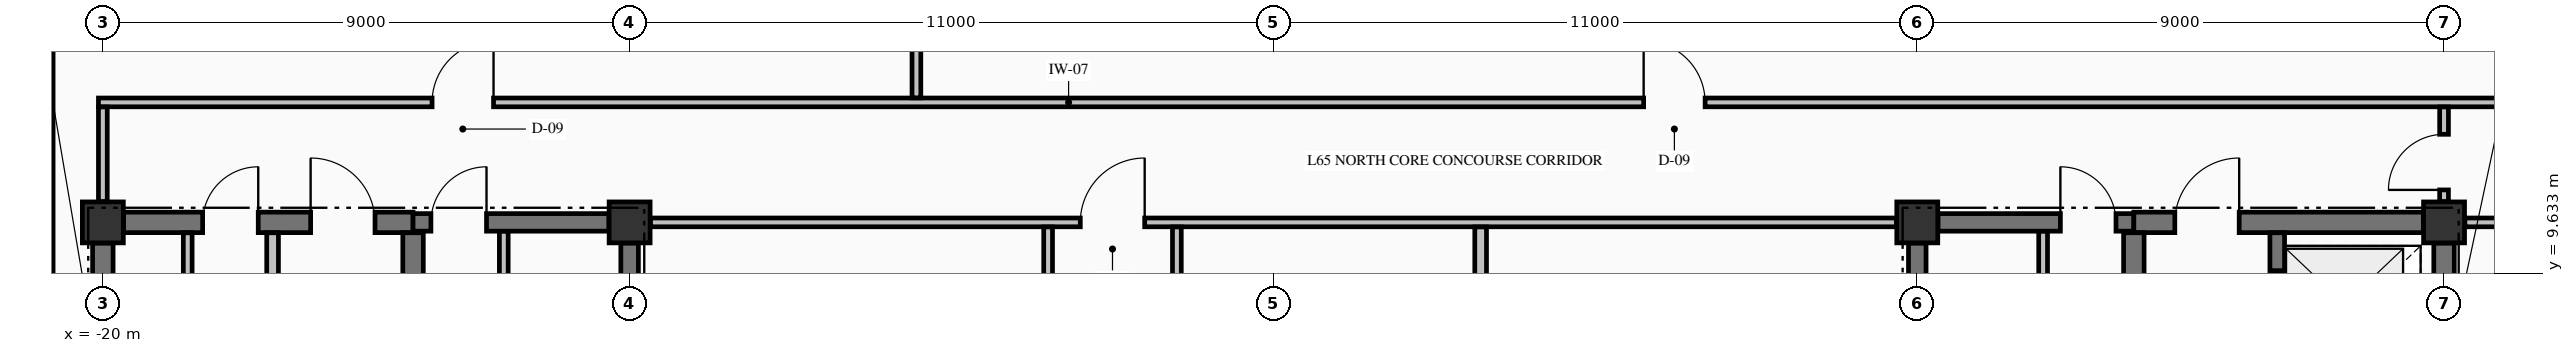
"""IFC4 building model, lengths in metres.
Left out: names, types, materials, properties, quantities, classifications, styles, units other than length and angle.
Written with IfcOpenShell. Run it as: python <this file> out.ifc"""

import sys

from ifc_helpers import new_model, si_unit, direction, frame, frame_2d, origin, origin_2d, place, context, subcontext, project, spatial, rectangle, extrude, element, fill, save


model = new_model("IFC4")
c1 = context("Model", 3, precision=1e-05, world=origin(), true_north=direction((0.0, 1.0)))
c2 = subcontext(c1, "Body", "Model", "MODEL_VIEW")
j1 = project(units=[si_unit("LENGTHUNIT", "METRE"), si_unit("PLANEANGLEUNIT", "RADIAN")], contexts=[c1])
p1 = place(None, origin())
s1 = spatial("IfcSite", under=j1, at=p1, CompositionType="ELEMENT")
p2 = place(p1, origin())
s2 = spatial("IfcBuilding", under=s1, at=p2, CompositionType="ELEMENT")
p3 = place(p2, frame((0.0, 0.0, 246.2)))
s3 = spatial("IfcBuildingStorey", under=s2, at=p3, CompositionType="ELEMENT", Elevation=246.2)
for number, where, z_axis, x_axis in (
    (1, (-20.0, 10.5, -0.25), (0.0, 0.0, 1.0), (1.0, 0.0, 0.0)),
    (2, (-11.0, 10.5, -0.25), (0.0, 0.0, 1.0), (1.0, 0.0, 0.0)),
    (3, (11.0, 10.5, -0.25), (0.0, 0.0, 1.0), (1.0, 0.0, 0.0)),
    (4, (20.0, 10.5, -0.25), (0.0, 0.0, 1.0), (1.0, 0.0, 0.0)),
):
    element("IfcColumn", number, at=place(p3, frame(where, z_axis=z_axis, x_axis=x_axis)), inside=s3, PredefinedType="COLUMN", context=c2, shape_type="SweptSolid", body=[
        extrude(rectangle(XDim=0.7, YDim=0.7, at=origin_2d()), origin(), (0.0, 0.0, 1.0), 3.055),
    ])
p4 = place(p3, frame((-21.0, 17.545, 0.0), z_axis=(0.0, 0.0, 1.0), x_axis=(0.0, -1.0, 0.0)))
e5 = element("IfcWall", 5, at=p4, inside=s3, PredefinedType="STANDARD", context=c2, shape_type="SweptSolid", body=[
    extrude(rectangle(XDim=8.09, YDim=0.3, at=frame_2d((4.045, 0.0))), origin(), (0.0, 0.0, 1.0), 2.197),
])
p5 = place(p3, frame((-19.646, 10.5, 0.0), z_axis=(0.0, 0.0, 1.0), x_axis=(1.0, 0.0, 0.0)))
e6 = element("IfcWall", 6, at=p5, inside=s3, PredefinedType="SHEAR", context=c2, shape_type="SweptSolid", body=[
    extrude(rectangle(XDim=4.946, YDim=0.35, at=frame_2d((2.473, 0.0))), origin(), (0.0, 0.0, 1.0), 2.805),
])
p6 = place(p5, frame((3.196, 0.0, 0.0)))
e7 = element("IfcOpeningElement", 7, at=p6, cuts=e6, PredefinedType="OPENING", context=c2, shape_type="SweptSolid", body=[
    extrude(rectangle(XDim=1.1, YDim=2.15, at=frame_2d((0.55, 1.075))), frame((0.0, 0.185, 0.0), z_axis=(0.0, -1.0, 0.0), x_axis=(1.0, 0.0, 0.0)), (0.0, 0.0, 1.0), 0.37),
])
p7 = place(p5, frame((1.351, 0.0, 0.0)))
e8 = element("IfcOpeningElement", 8, at=p7, cuts=e6, PredefinedType="OPENING", context=c2, shape_type="SweptSolid", body=[
    extrude(rectangle(XDim=0.95, YDim=2.15, at=frame_2d((0.475, 1.075))), frame((0.0, 0.185, 0.0), z_axis=(0.0, -1.0, 0.0), x_axis=(1.0, 0.0, 0.0)), (0.0, 0.0, 1.0), 0.37),
])
p8 = place(p3, frame((-14.7, 10.5, 0.0), z_axis=(0.0, 0.0, 1.0), x_axis=(1.0, 0.0, 0.0)))
e9 = element("IfcWall", 9, at=p8, inside=s3, PredefinedType="SHEAR", context=c2, shape_type="SweptSolid", body=[
    extrude(rectangle(XDim=3.346, YDim=0.3, at=frame_2d((1.673, 0.0))), origin(), (0.0, 0.0, 1.0), 2.805),
])
p9 = place(p8, frame((0.305, 0.0, 0.0)))
e10 = element("IfcOpeningElement", 10, at=p9, cuts=e9, PredefinedType="OPENING", context=c2, shape_type="SweptSolid", body=[
    extrude(rectangle(XDim=0.95, YDim=2.15, at=frame_2d((0.475, 1.075))), frame((0.0, 0.16, 0.0), z_axis=(0.0, -1.0, 0.0), x_axis=(1.0, 0.0, 0.0)), (0.0, 0.0, 1.0), 0.32),
])
p10 = place(p3, frame((11.354, 10.5, 0.0), z_axis=(0.0, 0.0, 1.0), x_axis=(1.0, 0.0, 0.0)))
e11 = element("IfcWall", 11, at=p10, inside=s3, PredefinedType="SHEAR", context=c2, shape_type="SweptSolid", body=[
    extrude(rectangle(XDim=3.346, YDim=0.3, at=frame_2d((1.673, 0.0))), origin(), (0.0, 0.0, 1.0), 2.805),
])
p11 = place(p10, frame((2.091, 0.0, 0.0)))
e12 = element("IfcOpeningElement", 12, at=p11, cuts=e11, PredefinedType="OPENING", context=c2, shape_type="SweptSolid", body=[
    extrude(rectangle(XDim=0.95, YDim=2.15, at=frame_2d((0.475, 1.075))), frame((0.0, 0.16, 0.0), z_axis=(0.0, -1.0, 0.0), x_axis=(1.0, 0.0, 0.0)), (0.0, 0.0, 1.0), 0.32),
])
p12 = place(p3, frame((14.7, 10.5, 0.0), z_axis=(0.0, 0.0, 1.0), x_axis=(1.0, 0.0, 0.0)))
e13 = element("IfcWall", 13, at=p12, inside=s3, PredefinedType="SHEAR", context=c2, shape_type="SweptSolid", body=[
    extrude(rectangle(XDim=4.946, YDim=0.35, at=frame_2d((2.473, 0.0))), origin(), (0.0, 0.0, 1.0), 2.805),
])
p13 = place(p12, frame((0.7, 0.0, 0.0)))
e14 = element("IfcOpeningElement", 14, at=p13, cuts=e13, PredefinedType="OPENING", context=c2, shape_type="SweptSolid", body=[
    extrude(rectangle(XDim=1.1, YDim=2.15, at=frame_2d((0.55, 1.075))), frame((0.0, 0.185, 0.0), z_axis=(0.0, -1.0, 0.0), x_axis=(1.0, 0.0, 0.0)), (0.0, 0.0, 1.0), 0.37),
])
p14 = place(p3, frame((-10.644, 10.5, 0.0), z_axis=(0.0, 0.0, 1.0), x_axis=(1.0, 0.0, 0.0)))
e15 = element("IfcWall", 15, at=p14, inside=s3, PredefinedType="PARTITIONING", context=c2, shape_type="SweptSolid", body=[
    extrude(rectangle(XDim=21.288, YDim=0.15, at=frame_2d((10.644, 0.0))), origin(), (0.0, 0.0, 1.0), 2.805),
])
p15 = place(p14, frame((7.344, 0.0, 0.0)))
e16 = element("IfcOpeningElement", 16, at=p15, cuts=e15, PredefinedType="OPENING", context=c2, shape_type="SweptSolid", body=[
    extrude(rectangle(XDim=1.1, YDim=2.15, at=frame_2d((0.55, 1.075))), frame((0.0, 0.085, 0.0), z_axis=(0.0, -1.0, 0.0), x_axis=(1.0, 0.0, 0.0)), (0.0, 0.0, 1.0), 0.17),
])
p16 = place(p3, frame((20.356, 10.5, 0.0), z_axis=(0.0, 0.0, 1.0), x_axis=(1.0, 0.0, 0.0)))
e17 = element("IfcWall", 17, at=p16, inside=s3, PredefinedType="PARTITIONING", context=c2, shape_type="SweptSolid", body=[
    extrude(rectangle(XDim=5.479, YDim=0.15, at=frame_2d((2.74, 0.0))), origin(), (0.0, 0.0, 1.0), 2.805),
])
p17 = place(p16, frame((2.169, 0.0, 0.0)))
e18 = element("IfcOpeningElement", 18, at=p17, cuts=e17, PredefinedType="OPENING", context=c2, shape_type="SweptSolid", body=[
    extrude(rectangle(XDim=0.95, YDim=2.15, at=frame_2d((0.475, 1.075))), frame((0.0, 0.085, 0.0), z_axis=(0.0, -1.0, 0.0), x_axis=(1.0, 0.0, 0.0)), (0.0, 0.0, 1.0), 0.17),
])
p18 = place(p3, frame((-20.075, 12.55, 0.0), z_axis=(0.0, 0.0, 1.0), x_axis=(1.0, 0.0, 0.0)))
e19 = element("IfcWall", 19, at=p18, inside=s3, PredefinedType="PARTITIONING", context=c2, shape_type="SweptSolid", body=[
    extrude(rectangle(XDim=45.91, YDim=0.15, at=frame_2d((22.955, 0.0))), origin(), (0.0, 0.0, 1.0), 2.805),
])
p19 = place(p18, frame((5.7, 0.0, 0.0)))
e20 = element("IfcOpeningElement", 20, at=p19, cuts=e19, PredefinedType="OPENING", context=c2, shape_type="SweptSolid", body=[
    extrude(rectangle(XDim=1.05, YDim=2.15, at=frame_2d((0.525, 1.075))), frame((0.0, 0.085, 0.0), z_axis=(0.0, -1.0, 0.0), x_axis=(1.0, 0.0, 0.0)), (0.0, 0.0, 1.0), 0.17),
])
p20 = place(p18, frame((26.4, 0.0, 0.0)))
e21 = element("IfcOpeningElement", 21, at=p20, cuts=e19, PredefinedType="OPENING", context=c2, shape_type="SweptSolid", body=[
    extrude(rectangle(XDim=1.05, YDim=2.15, at=frame_2d((0.525, 1.075))), frame((0.0, 0.085, 0.0), z_axis=(0.0, -1.0, 0.0), x_axis=(1.0, 0.0, 0.0)), (0.0, 0.0, 1.0), 0.17),
])
p21 = place(p3, frame((-20.0, 5.327, 0.0), z_axis=(0.0, 0.0, 1.0), x_axis=(0.0, 1.0, 0.0)))
e22 = element("IfcWall", 22, at=p21, inside=s3, PredefinedType="SHEAR", context=c2, shape_type="SweptSolid", body=[
    extrude(rectangle(XDim=4.819, YDim=0.35, at=frame_2d((2.41, 0.0))), origin(), (0.0, 0.0, 1.0), 2.805),
])
p22 = place(p3, frame((-14.7, 5.852, 0.0), z_axis=(0.0, 0.0, 1.0), x_axis=(0.0, 1.0, 0.0)))
e23 = element("IfcWall", 23, at=p22, inside=s3, PredefinedType="SHEAR", context=c2, shape_type="SweptSolid", body=[
    extrude(rectangle(XDim=4.471, YDim=0.35, at=frame_2d((2.235, 0.0))), origin(), (0.0, 0.0, 1.0), 2.805),
])
for number, where, z_axis, x_axis in (
    (24, (-11.0, 5.852, 0.0), (0.0, 0.0, 1.0), (0.0, 1.0, 0.0)),
    (25, (11.0, 5.852, 0.0), (0.0, 0.0, 1.0), (0.0, 1.0, 0.0)),
):
    element("IfcWall", number, at=place(p3, frame(where, z_axis=z_axis, x_axis=x_axis)), inside=s3, PredefinedType="SHEAR", context=c2, shape_type="SweptSolid", body=[
        extrude(rectangle(XDim=4.294, YDim=0.3, at=frame_2d((2.147, 0.0))), origin(), (0.0, 0.0, 1.0), 2.805),
    ])
p23 = place(p3, frame((14.7, 5.852, 0.0), z_axis=(0.0, 0.0, 1.0), x_axis=(0.0, 1.0, 0.0)))
e26 = element("IfcWall", 26, at=p23, inside=s3, PredefinedType="SHEAR", context=c2, shape_type="SweptSolid", body=[
    extrude(rectangle(XDim=4.471, YDim=0.35, at=frame_2d((2.235, 0.0))), origin(), (0.0, 0.0, 1.0), 2.805),
])
p24 = place(p3, frame((17.15, 7.877, 0.0), z_axis=(0.0, 0.0, 1.0), x_axis=(0.0, 1.0, 0.0)))
e27 = element("IfcWall", 27, at=p24, inside=s3, PredefinedType="SOLIDWALL", context=c2, shape_type="SweptSolid", body=[
    extrude(rectangle(XDim=2.446, YDim=0.25, at=frame_2d((1.223, 0.0))), origin(), (0.0, 0.0, 1.0), 2.805),
])
p25 = place(p24, frame((0.698, 0.0, 0.0)))
e28 = element("IfcOpeningElement", 28, at=p25, cuts=e27, PredefinedType="OPENING", context=c2, shape_type="SweptSolid", body=[
    extrude(rectangle(XDim=1.1, YDim=2.2, at=frame_2d((0.55, 1.1))), frame((0.0, 0.135, 0.0), z_axis=(0.0, -1.0, 0.0), x_axis=(1.0, 0.0, 0.0)), (0.0, 0.0, 1.0), 0.27),
])
p26 = place(p3, frame((20.0, 7.877, 0.0), z_axis=(0.0, 0.0, 1.0), x_axis=(0.0, 1.0, 0.0)))
e29 = element("IfcWall", 29, at=p26, inside=s3, PredefinedType="SHEAR", context=c2, shape_type="SweptSolid", body=[
    extrude(rectangle(XDim=2.269, YDim=0.35, at=frame_2d((1.135, 0.0))), origin(), (0.0, 0.0, 1.0), 2.805),
])
p27 = place(p3, frame((-20.0, 10.856, 0.0), z_axis=(0.0, 0.0, 1.0), x_axis=(0.0, 1.0, 0.0)))
e30 = element("IfcWall", 30, at=p27, inside=s3, PredefinedType="PARTITIONING", context=c2, shape_type="SweptSolid", body=[
    extrude(rectangle(XDim=1.616, YDim=0.15, at=frame_2d((0.808, 0.0))), origin(), (0.0, 0.0, 1.0), 2.395),
])
p28 = place(p3, frame((-18.55, 5.328, 0.0), z_axis=(0.0, 0.0, 1.0), x_axis=(0.0, 1.0, 0.0)))
e31 = element("IfcWall", 31, at=p28, inside=s3, PredefinedType="PARTITIONING", context=c2, shape_type="SweptSolid", body=[
    extrude(rectangle(XDim=4.994, YDim=0.15, at=frame_2d((2.497, 0.0))), origin(), (0.0, 0.0, 1.0), 2.805),
])
p29 = place(p28, frame((2.047, 0.0, 0.0)))
e32 = element("IfcOpeningElement", 32, at=p29, cuts=e31, PredefinedType="OPENING", context=c2, shape_type="SweptSolid", body=[
    extrude(rectangle(XDim=0.95, YDim=2.15, at=frame_2d((0.475, 1.075))), frame((0.0, 0.085, 0.0), z_axis=(0.0, -1.0, 0.0), x_axis=(1.0, 0.0, 0.0)), (0.0, 0.0, 1.0), 0.17),
])
p30 = place(p3, frame((-17.1, 5.328, 0.0), z_axis=(0.0, 0.0, 1.0), x_axis=(0.0, 1.0, 0.0)))
e33 = element("IfcWall", 33, at=p30, inside=s3, PredefinedType="PARTITIONING", context=c2, shape_type="SweptSolid", body=[
    extrude(rectangle(XDim=4.994, YDim=0.2, at=frame_2d((2.497, 0.0))), origin(), (0.0, 0.0, 1.0), 2.805),
])
p31 = place(p3, frame((-13.15, 7.228, 0.0), z_axis=(0.0, 0.0, 1.0), x_axis=(0.0, 1.0, 0.0)))
e34 = element("IfcWall", 34, at=p31, inside=s3, PredefinedType="PARTITIONING", context=c2, shape_type="SweptSolid", body=[
    extrude(rectangle(XDim=3.119, YDim=0.15, at=frame_2d((1.56, 0.0))), origin(), (0.0, 0.0, 1.0), 2.805),
])
p32 = place(p31, frame((1.097, 0.0, 0.0)))
e35 = element("IfcOpeningElement", 35, at=p32, cuts=e34, PredefinedType="OPENING", context=c2, shape_type="SweptSolid", body=[
    extrude(rectangle(XDim=0.95, YDim=2.15, at=frame_2d((0.475, 1.075))), frame((0.0, 0.085, 0.0), z_axis=(0.0, -1.0, 0.0), x_axis=(1.0, 0.0, 0.0)), (0.0, 0.0, 1.0), 0.17),
])
p33 = place(p3, frame((-6.1, 12.628, 0.0), z_axis=(0.0, 0.0, 1.0), x_axis=(0.0, 1.0, 0.0)))
e36 = element("IfcWall", 36, at=p33, inside=s3, PredefinedType="PARTITIONING", context=c2, shape_type="SweptSolid", body=[
    extrude(rectangle(XDim=10.707, YDim=0.15, at=frame_2d((5.354, 0.0))), origin(), (0.0, 0.0, 1.0), 2.805),
])
for number, where, z_axis, x_axis in (
    (37, (-3.85, 2.978, 0.0), (0.0, 0.0, 1.0), (0.0, 1.0, 0.0)),
    (38, (-1.65, 2.978, 0.0), (0.0, 0.0, 1.0), (0.0, 1.0, 0.0)),
):
    element("IfcWall", number, at=place(p3, frame(where, z_axis=z_axis, x_axis=x_axis)), inside=s3, PredefinedType="PARTITIONING", context=c2, shape_type="SweptSolid", body=[
        extrude(rectangle(XDim=7.444, YDim=0.15, at=frame_2d((3.722, 0.0))), origin(), (0.0, 0.0, 1.0), 2.805),
    ])
p34 = place(p3, frame((3.54, 2.978, 0.0), z_axis=(0.0, 0.0, 1.0), x_axis=(0.0, 1.0, 0.0)))
e39 = element("IfcWall", 39, at=p34, inside=s3, PredefinedType="PARTITIONING", context=c2, shape_type="SweptSolid", body=[
    extrude(rectangle(XDim=7.444, YDim=0.2, at=frame_2d((3.722, 0.0))), origin(), (0.0, 0.0, 1.0), 2.805),
])
p35 = place(p3, frame((13.15, 7.228, 0.0), z_axis=(0.0, 0.0, 1.0), x_axis=(0.0, 1.0, 0.0)))
e40 = element("IfcWall", 40, at=p35, inside=s3, PredefinedType="PARTITIONING", context=c2, shape_type="SweptSolid", body=[
    extrude(rectangle(XDim=3.119, YDim=0.15, at=frame_2d((1.56, 0.0))), origin(), (0.0, 0.0, 1.0), 2.805),
])
p36 = place(p35, frame((1.097, 0.0, 0.0)))
e41 = element("IfcOpeningElement", 41, at=p36, cuts=e40, PredefinedType="OPENING", context=c2, shape_type="SweptSolid", body=[
    extrude(rectangle(XDim=0.95, YDim=2.15, at=frame_2d((0.475, 1.075))), frame((0.0, 0.085, 0.0), z_axis=(0.0, -1.0, 0.0), x_axis=(1.0, 0.0, 0.0)), (0.0, 0.0, 1.0), 0.17),
])
p37 = place(p3, frame((20.0, 10.856, 0.0), z_axis=(0.0, 0.0, 1.0), x_axis=(0.0, 1.0, 0.0)))
e42 = element("IfcWall", 42, at=p37, inside=s3, PredefinedType="PARTITIONING", context=c2, shape_type="SweptSolid", body=[
    extrude(rectangle(XDim=1.616, YDim=0.15, at=frame_2d((0.808, 0.0))), origin(), (0.0, 0.0, 1.0), 2.805),
])
p38 = place(p37, frame((0.199, 0.0, 0.0)))
e43 = element("IfcOpeningElement", 43, at=p38, cuts=e42, PredefinedType="OPENING", context=c2, shape_type="SweptSolid", body=[
    extrude(rectangle(XDim=0.95, YDim=2.15, at=frame_2d((0.475, 1.075))), frame((0.0, 0.085, 0.0), z_axis=(0.0, -1.0, 0.0), x_axis=(1.0, 0.0, 0.0)), (0.0, 0.0, 1.0), 0.17),
])
p39 = place(p9, origin())
e44 = element("IfcDoor", 44, at=p39, inside=s3, OperationType="SINGLE_SWING_RIGHT", PredefinedType="DOOR", context=c2, shape_type="SweptSolid", body=[
    extrude(rectangle(XDim=0.95, YDim=2.15, at=frame_2d((0.475, 1.075))), frame((0.0, 0.025, 0.0), z_axis=(0.0, -1.0, 0.0), x_axis=(1.0, 0.0, 0.0)), (0.0, 0.0, 1.0), 0.05),
])
fill(e10, e44)
p40 = place(p11, origin())
e45 = element("IfcDoor", 45, at=p40, inside=s3, OperationType="SINGLE_SWING_LEFT", PredefinedType="DOOR", context=c2, shape_type="SweptSolid", body=[
    extrude(rectangle(XDim=0.95, YDim=2.15, at=frame_2d((0.475, 1.075))), frame((0.0, 0.025, 0.0), z_axis=(0.0, -1.0, 0.0), x_axis=(1.0, 0.0, 0.0)), (0.0, 0.0, 1.0), 0.05),
])
fill(e12, e45)
p41 = place(p6, origin())
e46 = element("IfcDoor", 46, at=p41, inside=s3, OperationType="SINGLE_SWING_LEFT", PredefinedType="DOOR", context=c2, shape_type="SweptSolid", body=[
    extrude(rectangle(XDim=1.1, YDim=2.15, at=frame_2d((0.55, 1.075))), frame((0.0, 0.025, 0.0), z_axis=(0.0, -1.0, 0.0), x_axis=(1.0, 0.0, 0.0)), (0.0, 0.0, 1.0), 0.05),
])
fill(e7, e46)
p42 = place(p7, origin())
e47 = element("IfcDoor", 47, at=p42, inside=s3, OperationType="SINGLE_SWING_RIGHT", PredefinedType="DOOR", context=c2, shape_type="SweptSolid", body=[
    extrude(rectangle(XDim=0.95, YDim=2.15, at=frame_2d((0.475, 1.075))), frame((0.0, 0.025, 0.0), z_axis=(0.0, -1.0, 0.0), x_axis=(1.0, 0.0, 0.0)), (0.0, 0.0, 1.0), 0.05),
])
fill(e8, e47)
p43 = place(p25, origin())
e48 = element("IfcDoor", 48, at=p43, inside=s3, OperationType="SLIDING_TO_RIGHT", PredefinedType="DOOR", context=c2, shape_type="SweptSolid", body=[
    extrude(rectangle(XDim=1.1, YDim=2.2, at=frame_2d((0.55, 1.1))), frame((0.0, 0.025, 0.0), z_axis=(0.0, -1.0, 0.0), x_axis=(1.0, 0.0, 0.0)), (0.0, 0.0, 1.0), 0.05),
])
fill(e28, e48)
p44 = place(p13, origin())
e49 = element("IfcDoor", 49, at=p44, inside=s3, OperationType="SINGLE_SWING_RIGHT", PredefinedType="DOOR", context=c2, shape_type="SweptSolid", body=[
    extrude(rectangle(XDim=1.1, YDim=2.15, at=frame_2d((0.55, 1.075))), frame((0.0, 0.025, 0.0), z_axis=(0.0, -1.0, 0.0), x_axis=(1.0, 0.0, 0.0)), (0.0, 0.0, 1.0), 0.05),
])
fill(e14, e49)
p45 = place(p15, origin())
e50 = element("IfcDoor", 50, at=p45, inside=s3, OperationType="SINGLE_SWING_RIGHT", PredefinedType="DOOR", context=c2, shape_type="SweptSolid", body=[
    extrude(rectangle(XDim=1.1, YDim=2.15, at=frame_2d((0.55, 1.075))), frame((0.0, 0.025, 0.0), z_axis=(0.0, -1.0, 0.0), x_axis=(1.0, 0.0, 0.0)), (0.0, 0.0, 1.0), 0.05),
])
fill(e16, e50)
p46 = place(p19, origin())
e51 = element("IfcDoor", 51, at=p46, inside=s3, OperationType="SINGLE_SWING_RIGHT", PredefinedType="DOOR", context=c2, shape_type="SweptSolid", body=[
    extrude(rectangle(XDim=1.05, YDim=2.15, at=frame_2d((0.525, 1.075))), frame((0.0, 0.025, 0.0), z_axis=(0.0, -1.0, 0.0), x_axis=(1.0, 0.0, 0.0)), (0.0, 0.0, 1.0), 0.05),
])
fill(e20, e51)
p47 = place(p20, origin())
e52 = element("IfcDoor", 52, at=p47, inside=s3, OperationType="SINGLE_SWING_LEFT", PredefinedType="DOOR", context=c2, shape_type="SweptSolid", body=[
    extrude(rectangle(XDim=1.05, YDim=2.15, at=frame_2d((0.525, 1.075))), frame((0.0, 0.025, 0.0), z_axis=(0.0, -1.0, 0.0), x_axis=(1.0, 0.0, 0.0)), (0.0, 0.0, 1.0), 0.05),
])
fill(e21, e52)
p48 = place(p38, origin())
e53 = element("IfcDoor", 53, at=p48, inside=s3, OperationType="SINGLE_SWING_LEFT", PredefinedType="DOOR", context=c2, shape_type="SweptSolid", body=[
    extrude(rectangle(XDim=0.95, YDim=2.15, at=frame_2d((0.475, 1.075))), frame((0.0, 0.025, 0.0), z_axis=(0.0, -1.0, 0.0), x_axis=(1.0, 0.0, 0.0)), (0.0, 0.0, 1.0), 0.05),
])
fill(e43, e53)
save(model, sys.argv[1])
